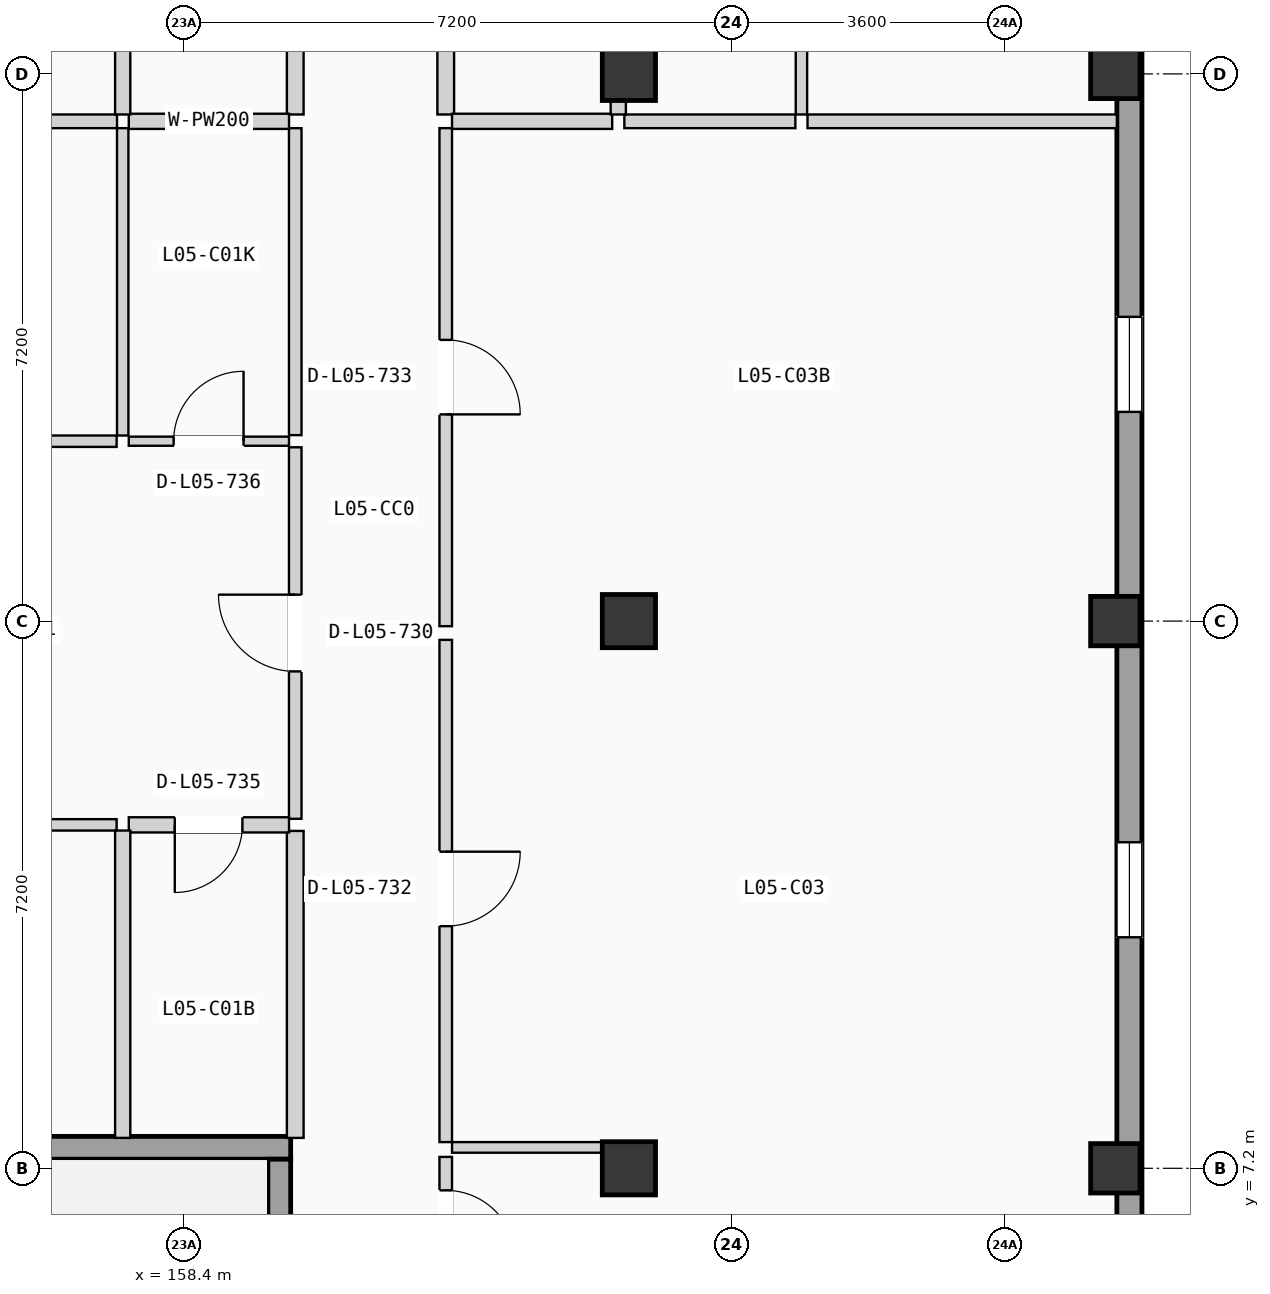
"""IFC4 building model, lengths in metres.
Left out: names, types, materials, properties, quantities, classifications, styles, units other than length and angle.
Written with IfcOpenShell. Run it as: python <this file> out.ifc"""

import sys

from ifc_helpers import new_model, si_unit, direction, frame, frame_2d, origin, origin_2d, place, context, subcontext, project, spatial, rectangle, extrude, element, fill, save


model = new_model("IFC4")
c1 = context("Model", 3, precision=1e-05, world=origin(), true_north=direction((0.0, 1.0)))
c2 = subcontext(c1, "Body", "Model", "MODEL_VIEW")
j1 = project(units=[si_unit("LENGTHUNIT", "METRE"), si_unit("PLANEANGLEUNIT", "RADIAN")], contexts=[c1])
p1 = place(None, origin())
s1 = spatial("IfcSite", under=j1, at=p1, CompositionType="ELEMENT")
p2 = place(p1, origin())
s2 = spatial("IfcBuilding", under=s1, at=p2, CompositionType="ELEMENT")
p3 = place(p2, frame((0.0, 0.0, 18.375)))
s3 = spatial("IfcBuildingStorey", under=s2, at=p3, CompositionType="ELEMENT", Elevation=18.375)
for number, where, z_axis, x_axis in (
    (1, (164.25, 7.2, 0.0), (0.0, 0.0, 1.0), (1.0, 0.0, 0.0)),
    (2, (164.25, 14.4, 0.0), (0.0, 0.0, 1.0), (1.0, 0.0, 0.0)),
    (3, (164.25, 21.6, 0.0), (0.0, 0.0, 1.0), (1.0, 0.0, 0.0)),
):
    element("IfcColumn", number, at=place(p3, frame(where, z_axis=z_axis, x_axis=x_axis)), inside=s3, PredefinedType="COLUMN", context=c2, shape_type="SweptSolid", body=[
        extrude(rectangle(XDim=0.7, YDim=0.7, at=origin_2d()), origin(), (0.0, 0.0, 1.0), 3.15),
    ])
for number, where, z_axis, x_axis in (
    (4, (170.65, 7.2, 0.0), (0.0, 0.0, 1.0), (1.0, 0.0, 0.0)),
    (5, (170.65, 14.4, 0.0), (0.0, 0.0, 1.0), (1.0, 0.0, 0.0)),
    (6, (170.65, 21.6, 0.0), (0.0, 0.0, 1.0), (1.0, 0.0, 0.0)),
):
    element("IfcColumn", number, at=place(p3, frame(where, z_axis=z_axis, x_axis=x_axis)), inside=s3, PredefinedType="COLUMN", context=c2, shape_type="SweptSolid", body=[
        extrude(rectangle(XDim=0.65, YDim=0.65, at=origin_2d()), origin(), (0.0, 0.0, 1.0), 3.15),
    ])
p4 = place(p3, frame((170.835, 0.33, 0.0), z_axis=(0.0, 0.0, 1.0), x_axis=(0.0, 1.0, 0.0)))
e7 = element("IfcWall", 7, at=p4, inside=s3, PredefinedType="SOLIDWALL", context=c2, shape_type="SweptSolid", body=[
    extrude(rectangle(XDim=49.74, YDim=0.33, at=frame_2d((24.87, 0.0))), origin(), (0.0, 0.0, 1.0), 2.89),
])
p5 = place(p4, frame((9.91, 0.0, 0.855)))
e8 = element("IfcOpeningElement", 8, at=p5, cuts=e7, PredefinedType="OPENING", context=c2, shape_type="SweptSolid", body=[
    extrude(rectangle(XDim=1.25, YDim=1.35, at=frame_2d((0.625, 0.675))), frame((0.0, 0.175, 0.0), z_axis=(0.0, -1.0, 0.0), x_axis=(1.0, 0.0, 0.0)), (0.0, 0.0, 1.0), 0.35),
])
p6 = place(p4, frame((16.823, 0.0, 0.705)))
e9 = element("IfcOpeningElement", 9, at=p6, cuts=e7, PredefinedType="OPENING", context=c2, shape_type="SweptSolid", body=[
    extrude(rectangle(XDim=1.25, YDim=1.5, at=frame_2d((0.625, 0.75))), frame((0.0, 0.175, 0.0), z_axis=(0.0, -1.0, 0.0), x_axis=(1.0, 0.0, 0.0)), (0.0, 0.0, 1.0), 0.35),
])
p7 = place(p4, frame((31.065, 0.0, 0.555)))
e10 = element("IfcOpeningElement", 10, at=p7, cuts=e7, PredefinedType="OPENING", context=c2, shape_type="SweptSolid", body=[
    extrude(rectangle(XDim=1.25, YDim=1.65, at=frame_2d((0.625, 0.825))), frame((0.0, 0.175, 0.0), z_axis=(0.0, -1.0, 0.0), x_axis=(1.0, 0.0, 0.0)), (0.0, 0.0, 1.0), 0.35),
])
p8 = place(p4, frame((23.992, 0.0, 0.85)))
e11 = element("IfcOpeningElement", 11, at=p8, cuts=e7, PredefinedType="OPENING", context=c2, shape_type="SweptSolid", body=[
    extrude(rectangle(XDim=0.95, YDim=1.2, at=frame_2d((0.475, 0.6))), frame((0.0, 0.175, 0.0), z_axis=(0.0, -1.0, 0.0), x_axis=(1.0, 0.0, 0.0)), (0.0, 0.0, 1.0), 0.35),
])
p9 = place(p4, frame((38.53, 0.0, 0.9)))
e12 = element("IfcOpeningElement", 12, at=p9, cuts=e7, PredefinedType="OPENING", context=c2, shape_type="SweptSolid", body=[
    extrude(rectangle(XDim=1.35, YDim=1.2, at=frame_2d((0.675, 0.6))), frame((0.0, 0.175, 0.0), z_axis=(0.0, -1.0, 0.0), x_axis=(1.0, 0.0, 0.0)), (0.0, 0.0, 1.0), 0.35),
])
p10 = place(p3, frame((156.2, 7.47, 0.0), z_axis=(0.0, 0.0, 1.0), x_axis=(1.0, 0.0, 0.0)))
e13 = element("IfcWall", 13, at=p10, inside=s3, PredefinedType="SHEAR", context=c2, shape_type="SweptSolid", body=[
    extrude(rectangle(XDim=3.6, YDim=0.3, at=frame_2d((1.8, 0.0))), origin(), (0.0, 0.0, 1.0), 2.89),
])
p11 = place(p3, frame((159.65, 0.32, 0.0), z_axis=(0.0, 0.0, 1.0), x_axis=(0.0, 1.0, 0.0)))
e14 = element("IfcWall", 14, at=p11, inside=s3, PredefinedType="SHEAR", context=c2, shape_type="SweptSolid", body=[
    extrude(rectangle(XDim=7.0, YDim=0.3, at=frame_2d((3.5, 0.0))), origin(), (0.0, 0.0, 1.0), 2.89),
])
p12 = place(p11, frame((0.225, 0.0, 0.0)))
e15 = element("IfcOpeningElement", 15, at=p12, cuts=e14, PredefinedType="OPENING", context=c2, shape_type="SweptSolid", body=[
    extrude(rectangle(XDim=1.15, YDim=2.12, at=frame_2d((0.575, 1.06))), frame((0.0, 0.16, 0.0), z_axis=(0.0, -1.0, 0.0), x_axis=(1.0, 0.0, 0.0)), (0.0, 0.0, 1.0), 0.32),
])
p13 = place(p3, frame((161.84, 5.515, 0.0), z_axis=(0.0, 0.0, 1.0), x_axis=(0.0, 1.0, 0.0)))
e16 = element("IfcWall", 16, at=p13, inside=s3, PredefinedType="PARTITIONING", context=c2, shape_type="SweptSolid", body=[
    extrude(rectangle(XDim=1.835, YDim=0.165, at=frame_2d((0.917, 0.0))), origin(), (0.0, 0.0, 1.0), 2.87),
])
p14 = place(p13, frame((0.475, 0.0, 0.0)))
e17 = element("IfcOpeningElement", 17, at=p14, cuts=e16, PredefinedType="OPENING", context=c2, shape_type="SweptSolid", body=[
    extrude(rectangle(XDim=0.92, YDim=2.04, at=frame_2d((0.46, 1.02))), frame((0.0, 0.093, 0.0), z_axis=(0.0, -1.0, 0.0), x_axis=(1.0, 0.0, 0.0)), (0.0, 0.0, 1.0), 0.185),
])
p15 = place(p3, frame((161.923, 7.475, 0.0), z_axis=(0.0, 0.0, 1.0), x_axis=(1.0, 0.0, 0.0)))
e18 = element("IfcWall", 18, at=p15, inside=s3, PredefinedType="PARTITIONING", context=c2, shape_type="SweptSolid", body=[
    extrude(rectangle(XDim=2.127, YDim=0.14, at=frame_2d((1.063, 0.0))), origin(), (0.0, 0.0, 1.0), 2.87),
])
p16 = place(p3, frame((159.86, 11.799, 0.0), z_axis=(0.0, 0.0, 1.0), x_axis=(0.0, 1.0, 0.0)))
e19 = element("IfcWall", 19, at=p16, inside=s3, PredefinedType="PARTITIONING", context=c2, shape_type="SweptSolid", body=[
    extrude(rectangle(XDim=4.888, YDim=0.165, at=frame_2d((2.444, 0.0))), origin(), (0.0, 0.0, 1.0), 2.87),
])
p17 = place(p16, frame((1.939, 0.0, 0.0)))
e20 = element("IfcOpeningElement", 20, at=p17, cuts=e19, PredefinedType="OPENING", context=c2, shape_type="SweptSolid", body=[
    extrude(rectangle(XDim=1.01, YDim=2.11, at=frame_2d((0.505, 1.055))), frame((0.0, 0.093, 0.0), z_axis=(0.0, -1.0, 0.0), x_axis=(1.0, 0.0, 0.0)), (0.0, 0.0, 1.0), 0.185),
])
p18 = place(p3, frame((159.86, 7.6, 0.0), z_axis=(0.0, 0.0, 1.0), x_axis=(0.0, 1.0, 0.0)))
e21 = element("IfcWall", 21, at=p18, inside=s3, PredefinedType="PLUMBINGWALL", context=c2, shape_type="SweptSolid", body=[
    extrude(rectangle(XDim=4.039, YDim=0.22, at=frame_2d((2.02, 0.0))), origin(), (0.0, 0.0, 1.0), 2.87),
])
p19 = place(p3, frame((159.86, 16.847, 0.0), z_axis=(0.0, 0.0, 1.0), x_axis=(0.0, 1.0, 0.0)))
e22 = element("IfcWall", 22, at=p19, inside=s3, PredefinedType="PARTITIONING", context=c2, shape_type="SweptSolid", body=[
    extrude(rectangle(XDim=4.039, YDim=0.165, at=frame_2d((2.02, 0.0))), origin(), (0.0, 0.0, 1.0), 2.87),
])
p20 = place(p3, frame((159.86, 21.066, 0.0), z_axis=(0.0, 0.0, 1.0), x_axis=(0.0, 1.0, 0.0)))
e23 = element("IfcWall", 23, at=p20, inside=s3, PredefinedType="PLUMBINGWALL", context=c2, shape_type="SweptSolid", body=[
    extrude(rectangle(XDim=6.658, YDim=0.22, at=frame_2d((3.329, 0.0))), origin(), (0.0, 0.0, 1.0), 2.87),
])
p21 = place(p3, frame((161.84, 7.545, 0.0), z_axis=(0.0, 0.0, 1.0), x_axis=(0.0, 1.0, 0.0)))
e24 = element("IfcWall", 24, at=p21, inside=s3, PredefinedType="PARTITIONING", context=c2, shape_type="SweptSolid", body=[
    extrude(rectangle(XDim=6.608, YDim=0.165, at=frame_2d((3.304, 0.0))), origin(), (0.0, 0.0, 1.0), 2.87),
])
p22 = place(p21, frame((2.841, 0.0, 0.0)))
e25 = element("IfcOpeningElement", 25, at=p22, cuts=e24, PredefinedType="OPENING", context=c2, shape_type="SweptSolid", body=[
    extrude(rectangle(XDim=0.98, YDim=2.08, at=frame_2d((0.49, 1.04))), frame((0.0, 0.093, 0.0), z_axis=(0.0, -1.0, 0.0), x_axis=(1.0, 0.0, 0.0)), (0.0, 0.0, 1.0), 0.185),
])
p23 = place(p3, frame((161.84, 14.333, 0.0), z_axis=(0.0, 0.0, 1.0), x_axis=(0.0, 1.0, 0.0)))
e26 = element("IfcWall", 26, at=p23, inside=s3, PredefinedType="PARTITIONING", context=c2, shape_type="SweptSolid", body=[
    extrude(rectangle(XDim=6.553, YDim=0.165, at=frame_2d((3.276, 0.0))), origin(), (0.0, 0.0, 1.0), 2.87),
])
p24 = place(p23, frame((2.787, 0.0, 0.0)))
e27 = element("IfcOpeningElement", 27, at=p24, cuts=e26, PredefinedType="OPENING", context=c2, shape_type="SweptSolid", body=[
    extrude(rectangle(XDim=0.98, YDim=2.08, at=frame_2d((0.49, 1.04))), frame((0.0, 0.093, 0.0), z_axis=(0.0, -1.0, 0.0), x_axis=(1.0, 0.0, 0.0)), (0.0, 0.0, 1.0), 0.185),
])
p25 = place(p3, frame((161.84, 21.066, 0.0), z_axis=(0.0, 0.0, 1.0), x_axis=(0.0, 1.0, 0.0)))
e28 = element("IfcWall", 28, at=p25, inside=s3, PredefinedType="PLUMBINGWALL", context=c2, shape_type="SweptSolid", body=[
    extrude(rectangle(XDim=6.658, YDim=0.22, at=frame_2d((3.329, 0.0))), origin(), (0.0, 0.0, 1.0), 2.87),
])
p26 = place(p3, frame((157.67, 11.719, 0.0), z_axis=(0.0, 0.0, 1.0), x_axis=(1.0, 0.0, 0.0)))
e29 = element("IfcWall", 29, at=p26, inside=s3, PredefinedType="PLUMBINGWALL", context=c2, shape_type="SweptSolid", body=[
    extrude(rectangle(XDim=2.108, YDim=0.2, at=frame_2d((1.054, 0.0))), origin(), (0.0, 0.0, 1.0), 2.87),
])
p27 = place(p26, frame((0.605, 0.0, 0.0)))
e30 = element("IfcOpeningElement", 30, at=p27, cuts=e29, PredefinedType="OPENING", context=c2, shape_type="SweptSolid", body=[
    extrude(rectangle(XDim=0.89, YDim=2.03, at=frame_2d((0.445, 1.015))), frame((0.0, 0.11, 0.0), z_axis=(0.0, -1.0, 0.0), x_axis=(1.0, 0.0, 0.0)), (0.0, 0.0, 1.0), 0.22),
])
p28 = place(p3, frame((157.67, 16.767, 0.0), z_axis=(0.0, 0.0, 1.0), x_axis=(1.0, 0.0, 0.0)))
e31 = element("IfcWall", 31, at=p28, inside=s3, PredefinedType="PARTITIONING", context=c2, shape_type="SweptSolid", body=[
    extrude(rectangle(XDim=2.108, YDim=0.12, at=frame_2d((1.054, 0.0))), origin(), (0.0, 0.0, 1.0), 2.87),
])
p29 = place(p28, frame((0.59, 0.0, 0.0)))
e32 = element("IfcOpeningElement", 32, at=p29, cuts=e31, PredefinedType="OPENING", context=c2, shape_type="SweptSolid", body=[
    extrude(rectangle(XDim=0.92, YDim=2.02, at=frame_2d((0.46, 1.01))), frame((0.0, 0.07, 0.0), z_axis=(0.0, -1.0, 0.0), x_axis=(1.0, 0.0, 0.0)), (0.0, 0.0, 1.0), 0.14),
])
p30 = place(p3, frame((149.73, 11.719, 0.0), z_axis=(0.0, 0.0, 1.0), x_axis=(1.0, 0.0, 0.0)))
e33 = element("IfcWall", 33, at=p30, inside=s3, PredefinedType="PARTITIONING", context=c2, shape_type="SweptSolid", body=[
    extrude(rectangle(XDim=7.78, YDim=0.15, at=frame_2d((3.89, 0.0))), origin(), (0.0, 0.0, 1.0), 2.87),
])
p31 = place(p30, frame((3.36, 0.0, 0.0)))
e34 = element("IfcOpeningElement", 34, at=p31, cuts=e33, PredefinedType="OPENING", context=c2, shape_type="SweptSolid", body=[
    extrude(rectangle(XDim=1.08, YDim=2.1, at=frame_2d((0.54, 1.05))), frame((0.0, 0.085, 0.0), z_axis=(0.0, -1.0, 0.0), x_axis=(1.0, 0.0, 0.0)), (0.0, 0.0, 1.0), 0.17),
])
p32 = place(p3, frame((149.73, 16.767, 0.0), z_axis=(0.0, 0.0, 1.0), x_axis=(1.0, 0.0, 0.0)))
e35 = element("IfcWall", 35, at=p32, inside=s3, PredefinedType="PARTITIONING", context=c2, shape_type="SweptSolid", body=[
    extrude(rectangle(XDim=7.78, YDim=0.15, at=frame_2d((3.89, 0.0))), origin(), (0.0, 0.0, 1.0), 2.87),
])
p33 = place(p32, frame((3.45, 0.0, 0.0)))
e36 = element("IfcOpeningElement", 36, at=p33, cuts=e35, PredefinedType="OPENING", context=c2, shape_type="SweptSolid", body=[
    extrude(rectangle(XDim=0.9, YDim=2.04, at=frame_2d((0.45, 1.02))), frame((0.0, 0.085, 0.0), z_axis=(0.0, -1.0, 0.0), x_axis=(1.0, 0.0, 0.0)), (0.0, 0.0, 1.0), 0.17),
])
p34 = place(p3, frame((157.59, 7.6, 0.0), z_axis=(0.0, 0.0, 1.0), x_axis=(0.0, 1.0, 0.0)))
e37 = element("IfcWall", 37, at=p34, inside=s3, PredefinedType="PLUMBINGWALL", context=c2, shape_type="SweptSolid", body=[
    extrude(rectangle(XDim=4.044, YDim=0.2, at=frame_2d((2.022, 0.0))), origin(), (0.0, 0.0, 1.0), 2.87),
])
p35 = place(p3, frame((157.59, 16.842, 0.0), z_axis=(0.0, 0.0, 1.0), x_axis=(0.0, 1.0, 0.0)))
e38 = element("IfcWall", 38, at=p35, inside=s3, PredefinedType="PARTITIONING", context=c2, shape_type="SweptSolid", body=[
    extrude(rectangle(XDim=4.044, YDim=0.15, at=frame_2d((2.022, 0.0))), origin(), (0.0, 0.0, 1.0), 2.87),
])
p36 = place(p3, frame((157.67, 20.976, 0.0), z_axis=(0.0, 0.0, 1.0), x_axis=(1.0, 0.0, 0.0)))
e39 = element("IfcWall", 39, at=p36, inside=s3, PredefinedType="PLUMBINGWALL", context=c2, shape_type="SweptSolid", body=[
    extrude(rectangle(XDim=2.108, YDim=0.2, at=frame_2d((1.054, 0.0))), origin(), (0.0, 0.0, 1.0), 2.87),
])
p37 = place(p3, frame((155.167, 20.976, 0.0), z_axis=(0.0, 0.0, 1.0), x_axis=(1.0, 0.0, 0.0)))
e40 = element("IfcWall", 40, at=p37, inside=s3, PredefinedType="PARTITIONING", context=c2, shape_type="SweptSolid", body=[
    extrude(rectangle(XDim=2.348, YDim=0.18, at=frame_2d((1.174, 0.0))), origin(), (0.0, 0.0, 1.0), 2.87),
])
p38 = place(p3, frame((157.59, 21.066, 0.0), z_axis=(0.0, 0.0, 1.0), x_axis=(0.0, 1.0, 0.0)))
e41 = element("IfcWall", 41, at=p38, inside=s3, PredefinedType="PLUMBINGWALL", context=c2, shape_type="SweptSolid", body=[
    extrude(rectangle(XDim=6.678, YDim=0.2, at=frame_2d((3.339, 0.0))), origin(), (0.0, 0.0, 1.0), 2.87),
])
p39 = place(p38, frame((2.904, 0.0, 0.0)))
e42 = element("IfcOpeningElement", 42, at=p39, cuts=e41, PredefinedType="OPENING", context=c2, shape_type="SweptSolid", body=[
    extrude(rectangle(XDim=0.85, YDim=2.01, at=frame_2d((0.425, 1.005))), frame((0.0, 0.11, 0.0), z_axis=(0.0, -1.0, 0.0), x_axis=(1.0, 0.0, 0.0)), (0.0, 0.0, 1.0), 0.22),
])
p40 = place(p3, frame((161.923, 20.976, 0.0), z_axis=(0.0, 0.0, 1.0), x_axis=(1.0, 0.0, 0.0)))
e43 = element("IfcWall", 43, at=p40, inside=s3, PredefinedType="PLUMBINGWALL", context=c2, shape_type="SweptSolid", body=[
    extrude(rectangle(XDim=2.107, YDim=0.2, at=frame_2d((1.053, 0.0))), origin(), (0.0, 0.0, 1.0), 2.87),
])
p41 = place(p3, frame((166.6, 20.976, 0.0), z_axis=(0.0, 0.0, 1.0), x_axis=(1.0, 0.0, 0.0)))
e44 = element("IfcWall", 44, at=p41, inside=s3, PredefinedType="PARTITIONING", context=c2, shape_type="SweptSolid", body=[
    extrude(rectangle(XDim=4.07, YDim=0.18, at=frame_2d((2.035, 0.0))), origin(), (0.0, 0.0, 1.0), 2.87),
])
p42 = place(p3, frame((164.19, 20.976, 0.0), z_axis=(0.0, 0.0, 1.0), x_axis=(1.0, 0.0, 0.0)))
e45 = element("IfcWall", 45, at=p42, inside=s3, PredefinedType="PARTITIONING", context=c2, shape_type="SweptSolid", body=[
    extrude(rectangle(XDim=2.25, YDim=0.18, at=frame_2d((1.125, 0.0))), origin(), (0.0, 0.0, 1.0), 2.87),
])
p43 = place(p3, frame((164.11, 21.066, 0.0), z_axis=(0.0, 0.0, 1.0), x_axis=(0.0, 1.0, 0.0)))
e46 = element("IfcWall", 46, at=p43, inside=s3, PredefinedType="PLUMBINGWALL", context=c2, shape_type="SweptSolid", body=[
    extrude(rectangle(XDim=6.678, YDim=0.2, at=frame_2d((3.339, 0.0))), origin(), (0.0, 0.0, 1.0), 2.87),
])
p44 = place(p43, frame((2.904, 0.0, 0.0)))
e47 = element("IfcOpeningElement", 47, at=p44, cuts=e46, PredefinedType="OPENING", context=c2, shape_type="SweptSolid", body=[
    extrude(rectangle(XDim=0.85, YDim=2.01, at=frame_2d((0.425, 1.005))), frame((0.0, 0.11, 0.0), z_axis=(0.0, -1.0, 0.0), x_axis=(1.0, 0.0, 0.0)), (0.0, 0.0, 1.0), 0.22),
])
p45 = place(p3, frame((166.52, 21.066, 0.0), z_axis=(0.0, 0.0, 1.0), x_axis=(0.0, 1.0, 0.0)))
e48 = element("IfcWall", 48, at=p45, inside=s3, PredefinedType="PARTITIONING", context=c2, shape_type="SweptSolid", body=[
    extrude(rectangle(XDim=6.678, YDim=0.15, at=frame_2d((3.339, 0.0))), origin(), (0.0, 0.0, 1.0), 2.87),
])
p46 = place(p5, origin())
e49 = element("IfcWindow", 49, at=p46, inside=s3, PartitioningType="SINGLE_PANEL", PredefinedType="WINDOW", context=c2, shape_type="SweptSolid", body=[
    extrude(rectangle(XDim=1.25, YDim=1.35, at=frame_2d((0.625, 0.675))), frame((0.0, 0.03, 0.0), z_axis=(0.0, -1.0, 0.0), x_axis=(1.0, 0.0, 0.0)), (0.0, 0.0, 1.0), 0.06),
])
fill(e8, e49)
p47 = place(p6, origin())
e50 = element("IfcWindow", 50, at=p47, inside=s3, PartitioningType="SINGLE_PANEL", PredefinedType="WINDOW", context=c2, shape_type="SweptSolid", body=[
    extrude(rectangle(XDim=1.25, YDim=1.5, at=frame_2d((0.625, 0.75))), frame((0.0, 0.03, 0.0), z_axis=(0.0, -1.0, 0.0), x_axis=(1.0, 0.0, 0.0)), (0.0, 0.0, 1.0), 0.06),
])
fill(e9, e50)
p48 = place(p14, frame((0.92, 0.0, 0.0), z_axis=(0.0, 0.0, 1.0), x_axis=(-1.0, 0.0, 0.0)))
e51 = element("IfcDoor", 51, at=p48, inside=s3, OperationType="SINGLE_SWING_LEFT", PredefinedType="DOOR", context=c2, shape_type="SweptSolid", body=[
    extrude(rectangle(XDim=0.92, YDim=2.04, at=frame_2d((0.46, 1.02))), frame((0.0, 0.025, 0.0), z_axis=(0.0, -1.0, 0.0), x_axis=(1.0, 0.0, 0.0)), (0.0, 0.0, 1.0), 0.05),
])
fill(e17, e51)
p49 = place(p17, origin())
e52 = element("IfcDoor", 52, at=p49, inside=s3, OperationType="SINGLE_SWING_RIGHT", PredefinedType="DOOR", context=c2, shape_type="SweptSolid", body=[
    extrude(rectangle(XDim=1.01, YDim=2.11, at=frame_2d((0.505, 1.055))), frame((0.0, 0.025, 0.0), z_axis=(0.0, -1.0, 0.0), x_axis=(1.0, 0.0, 0.0)), (0.0, 0.0, 1.0), 0.05),
])
fill(e20, e52)
p50 = place(p22, frame((0.98, 0.0, 0.0), z_axis=(0.0, 0.0, 1.0), x_axis=(-1.0, 0.0, 0.0)))
e53 = element("IfcDoor", 53, at=p50, inside=s3, OperationType="SINGLE_SWING_RIGHT", PredefinedType="DOOR", context=c2, shape_type="SweptSolid", body=[
    extrude(rectangle(XDim=0.98, YDim=2.08, at=frame_2d((0.49, 1.04))), frame((0.0, 0.025, 0.0), z_axis=(0.0, -1.0, 0.0), x_axis=(1.0, 0.0, 0.0)), (0.0, 0.0, 1.0), 0.05),
])
fill(e25, e53)
p51 = place(p24, frame((0.98, 0.0, 0.0), z_axis=(0.0, 0.0, 1.0), x_axis=(-1.0, 0.0, 0.0)))
e54 = element("IfcDoor", 54, at=p51, inside=s3, OperationType="SINGLE_SWING_LEFT", PredefinedType="DOOR", context=c2, shape_type="SweptSolid", body=[
    extrude(rectangle(XDim=0.98, YDim=2.08, at=frame_2d((0.49, 1.04))), frame((0.0, 0.025, 0.0), z_axis=(0.0, -1.0, 0.0), x_axis=(1.0, 0.0, 0.0)), (0.0, 0.0, 1.0), 0.05),
])
fill(e27, e54)
p52 = place(p27, frame((0.89, 0.0, 0.0), z_axis=(0.0, 0.0, 1.0), x_axis=(-1.0, 0.0, 0.0)))
e55 = element("IfcDoor", 55, at=p52, inside=s3, OperationType="SINGLE_SWING_LEFT", PredefinedType="DOOR", context=c2, shape_type="SweptSolid", body=[
    extrude(rectangle(XDim=0.89, YDim=2.03, at=frame_2d((0.445, 1.015))), frame((0.0, 0.025, 0.0), z_axis=(0.0, -1.0, 0.0), x_axis=(1.0, 0.0, 0.0)), (0.0, 0.0, 1.0), 0.05),
])
fill(e30, e55)
p53 = place(p29, origin())
e56 = element("IfcDoor", 56, at=p53, inside=s3, OperationType="SINGLE_SWING_RIGHT", PredefinedType="DOOR", context=c2, shape_type="SweptSolid", body=[
    extrude(rectangle(XDim=0.92, YDim=2.02, at=frame_2d((0.46, 1.01))), frame((0.0, 0.025, 0.0), z_axis=(0.0, -1.0, 0.0), x_axis=(1.0, 0.0, 0.0)), (0.0, 0.0, 1.0), 0.05),
])
fill(e32, e56)
save(model, sys.argv[1])
